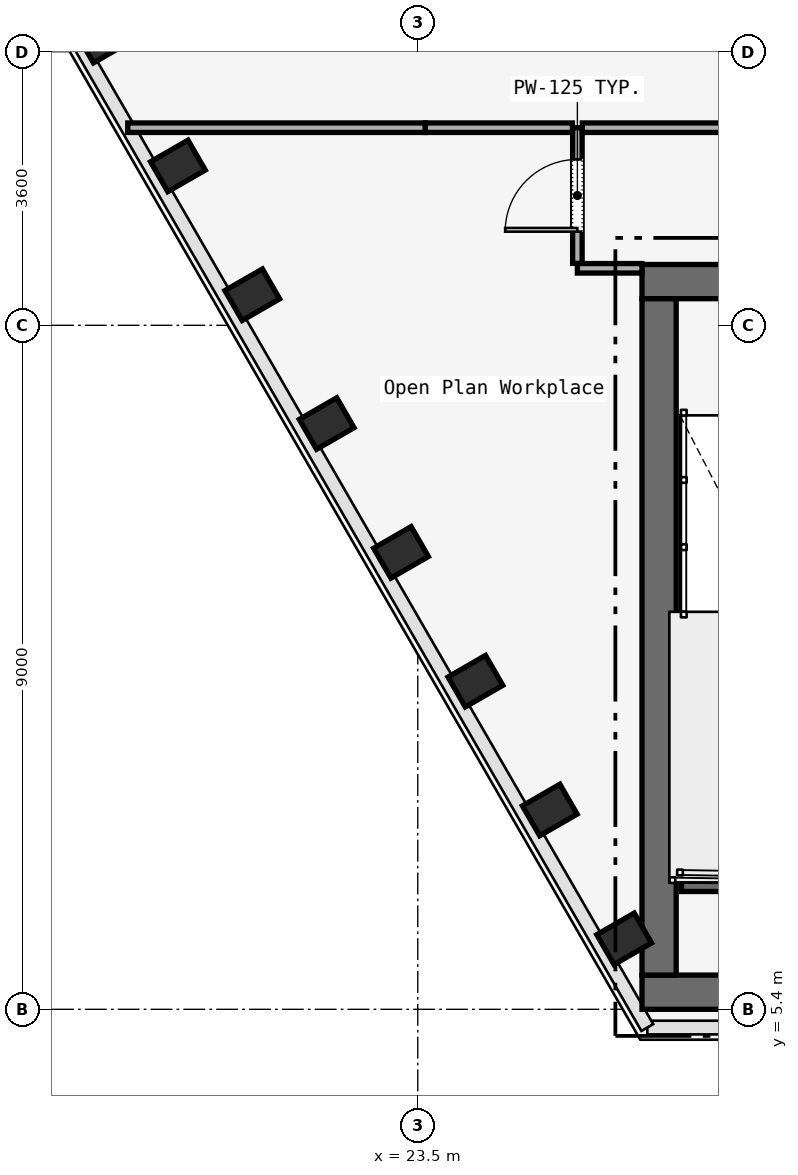
"""IFC4 building model, lengths in metres.
Left out: names, types, materials, properties, quantities, classifications, styles, units other than length and angle.
Written with IfcOpenShell. Run it as: python <this file> out.ifc"""

import sys

from ifc_helpers import new_model, si_unit, direction, frame, frame_2d, origin, origin_2d, place, context, subcontext, project, spatial, rectangle, i_section, extrude, element, fill, save


model = new_model("IFC4")
c1 = context("Model", 3, precision=1e-05, world=origin(), true_north=direction((0.0, 1.0)))
c2 = subcontext(c1, "Body", "Model", "MODEL_VIEW")
j1 = project(units=[si_unit("LENGTHUNIT", "METRE"), si_unit("PLANEANGLEUNIT", "RADIAN")], contexts=[c1])
p1 = place(None, origin())
s1 = spatial("IfcSite", under=j1, at=p1, CompositionType="ELEMENT")
p2 = place(p1, origin())
s2 = spatial("IfcBuilding", under=s1, at=p2, CompositionType="ELEMENT")
p3 = place(p2, frame((0.0, 0.0, 47.4)))
s3 = spatial("IfcBuildingStorey", under=s2, at=p3, CompositionType="ELEMENT", Elevation=47.4)
p4 = place(p3, frame((26.45, 14.975, 0.0), z_axis=(0.0, 0.0, 1.0), x_axis=(1.0, 0.0, 0.0)))
e1 = element("IfcWall", 1, at=p4, inside=s3, PredefinedType="SOLIDWALL", context=c2, shape_type="SweptSolid", body=[
    extrude(rectangle(XDim=31.1, YDim=0.45, at=frame_2d((15.55, 0.0))), origin(), (0.0, 0.0, 1.0), 3.58),
])
p5 = place(p4, frame((1.65, 0.0, 0.0)))
e2 = element("IfcOpeningElement", 2, at=p5, cuts=e1, PredefinedType="OPENING", context=c2, shape_type="SweptSolid", body=[
    extrude(rectangle(XDim=1.1, YDim=2.2, at=frame_2d((0.55, 1.1))), frame((0.0, 0.225, 0.0), z_axis=(0.0, -1.0, 0.0), x_axis=(1.0, 0.0, 0.0)), (0.0, 0.0, 1.0), 0.45),
])
p6 = place(p4, frame((13.65, 0.0, 0.0)))
e3 = element("IfcOpeningElement", 3, at=p6, cuts=e1, PredefinedType="OPENING", context=c2, shape_type="SweptSolid", body=[
    extrude(rectangle(XDim=1.1, YDim=2.2, at=frame_2d((0.55, 1.1))), frame((0.0, 0.225, 0.0), z_axis=(0.0, -1.0, 0.0), x_axis=(1.0, 0.0, 0.0)), (0.0, 0.0, 1.0), 0.45),
])
p7 = place(p4, frame((25.55, 0.0, 0.0)))
e4 = element("IfcOpeningElement", 4, at=p7, cuts=e1, PredefinedType="OPENING", context=c2, shape_type="SweptSolid", body=[
    extrude(rectangle(XDim=1.1, YDim=2.2, at=frame_2d((0.55, 1.1))), frame((0.0, 0.225, 0.0), z_axis=(0.0, -1.0, 0.0), x_axis=(1.0, 0.0, 0.0)), (0.0, 0.0, 1.0), 0.45),
])
p8 = place(p4, frame((10.7, 0.0, 0.0)))
e5 = element("IfcOpeningElement", 5, at=p8, cuts=e1, PredefinedType="OPENING", context=c2, shape_type="SweptSolid", body=[
    extrude(rectangle(XDim=1.4, YDim=2.2, at=frame_2d((0.7, 1.1))), frame((0.0, 0.225, 0.0), z_axis=(0.0, -1.0, 0.0), x_axis=(1.0, 0.0, 0.0)), (0.0, 0.0, 1.0), 0.45),
])
p9 = place(p4, frame((19.35, 0.0, 0.0)))
e6 = element("IfcOpeningElement", 6, at=p9, cuts=e1, PredefinedType="OPENING", context=c2, shape_type="SweptSolid", body=[
    extrude(rectangle(XDim=1.1, YDim=2.2, at=frame_2d((0.55, 1.1))), frame((0.0, 0.225, 0.0), z_axis=(0.0, -1.0, 0.0), x_axis=(1.0, 0.0, 0.0)), (0.0, 0.0, 1.0), 0.45),
])
p10 = place(p4, frame((21.4, 0.0, 0.0)))
e7 = element("IfcOpeningElement", 7, at=p10, cuts=e1, PredefinedType="OPENING", context=c2, shape_type="SweptSolid", body=[
    extrude(rectangle(XDim=0.9, YDim=2.1, at=frame_2d((0.45, 1.05))), frame((0.0, 0.225, 0.0), z_axis=(0.0, -1.0, 0.0), x_axis=(1.0, 0.0, 0.0)), (0.0, 0.0, 1.0), 0.45),
])
p11 = place(p4, frame((23.35, 0.0, 0.0)))
e8 = element("IfcOpeningElement", 8, at=p11, cuts=e1, PredefinedType="OPENING", context=c2, shape_type="SweptSolid", body=[
    extrude(rectangle(XDim=1.3, YDim=2.3, at=frame_2d((0.65, 1.15))), frame((0.0, 0.225, 0.0), z_axis=(0.0, -1.0, 0.0), x_axis=(1.0, 0.0, 0.0)), (0.0, 0.0, 1.0), 0.45),
])
p12 = place(p3, frame((26.45, 5.625, 0.0), z_axis=(0.0, 0.0, 1.0), x_axis=(1.0, 0.0, 0.0)))
e9 = element("IfcWall", 9, at=p12, inside=s3, PredefinedType="SOLIDWALL", context=c2, shape_type="SweptSolid", body=[
    extrude(rectangle(XDim=31.1, YDim=0.45, at=frame_2d((15.55, 0.0))), origin(), (0.0, 0.0, 1.0), 3.58),
])
p13 = place(p3, frame((26.675, 5.85, 0.0), z_axis=(0.0, 0.0, 1.0), x_axis=(0.0, 1.0, 0.0)))
e10 = element("IfcWall", 10, at=p13, inside=s3, PredefinedType="SOLIDWALL", context=c2, shape_type="SweptSolid", body=[
    extrude(rectangle(XDim=8.9, YDim=0.45, at=frame_2d((4.45, 0.0))), origin(), (0.0, 0.0, 1.0), 3.58),
])
for number, where, z_axis, x_axis in (
    (11, (19.365, 18.192, 0.0), (0.0, 0.0, 1.0), (-0.5, 0.866, 0.0)),
    (12, (20.344, 16.497, 0.0), (0.0, 0.0, 1.0), (-0.5, 0.866, 0.0)),
    (13, (21.323, 14.802, 0.0), (0.0, 0.0, 1.0), (-0.5, 0.866, 0.0)),
    (14, (22.301, 13.107, 0.0), (0.0, 0.0, 1.0), (-0.5, 0.866, 0.0)),
    (15, (23.28, 11.412, 0.0), (0.0, 0.0, 1.0), (-0.5, 0.866, 0.0)),
    (16, (24.258, 9.717, 0.0), (0.0, 0.0, 1.0), (-0.5, 0.866, 0.0)),
    (17, (25.237, 8.022, 0.0), (0.0, 0.0, 1.0), (-0.5, 0.866, 0.0)),
    (18, (26.216, 6.327, 0.0), (0.0, 0.0, 1.0), (-0.5, 0.866, 0.0)),
):
    element("IfcColumn", number, at=place(p3, frame(where, z_axis=z_axis, x_axis=x_axis)), inside=s3, PredefinedType="COLUMN", context=c2, shape_type="SweptSolid", body=[
        extrude(i_section(OverallWidth=0.454, OverallDepth=0.569, WebThickness=0.078, FlangeThickness=0.08, FilletRadius=0.015, at=origin_2d()), origin(), (0.0, 0.0, 1.0), 3.58),
    ])
p14 = place(p3, frame((26.97, 7.05, 0.0), z_axis=(0.0, 0.0, 1.0), x_axis=(1.0, 0.0, 0.0)))
e19 = element("IfcWall", 19, at=p14, inside=s3, PredefinedType="SOLIDWALL", context=c2, shape_type="SweptSolid", body=[
    extrude(rectangle(XDim=3.115, YDim=0.2, at=frame_2d((1.558, 0.0))), origin(), (0.0, 0.0, 1.0), 3.8),
])
p15 = place(p3, frame((26.45, 15.15, 0.0), z_axis=(0.0, 0.0, 1.0), x_axis=(-1.0, 0.0, 0.0)))
e20 = element("IfcWall", 20, at=p15, inside=s3, PredefinedType="PARTITIONING", context=c2, shape_type="SweptSolid", body=[
    extrude(rectangle(XDim=0.85, YDim=0.125, at=frame_2d((0.425, 0.0))), origin(), (0.0, 0.0, 1.0), 2.933),
])
p16 = place(p3, frame((25.6, 15.215, 0.0), z_axis=(0.0, 0.0, 1.0), x_axis=(0.0, 1.0, 0.0)))
e21 = element("IfcWall", 21, at=p16, inside=s3, PredefinedType="PARTITIONING", context=c2, shape_type="SweptSolid", body=[
    extrude(rectangle(XDim=1.785, YDim=0.125, at=frame_2d((0.893, 0.0))), origin(), (0.0, 0.0, 1.0), 2.933),
])
p17 = place(p16, frame((0.417, 0.0, 0.0)))
e22 = element("IfcOpeningElement", 22, at=p17, cuts=e21, PredefinedType="OPENING", context=c2, shape_type="SweptSolid", body=[
    extrude(rectangle(XDim=0.95, YDim=2.2, at=frame_2d((0.475, 1.1))), frame((0.0, 0.062, 0.0), z_axis=(0.0, -1.0, 0.0), x_axis=(1.0, 0.0, 0.0)), (0.0, 0.0, 1.0), 0.125),
])
p18 = place(p3, frame((25.665, 17.0, 0.0), z_axis=(0.0, 0.0, 1.0), x_axis=(1.0, 0.0, 0.0)))
e23 = element("IfcWall", 23, at=p18, inside=s3, PredefinedType="PARTITIONING", context=c2, shape_type="SweptSolid", body=[
    extrude(rectangle(XDim=4.135, YDim=0.125, at=frame_2d((2.067, 0.0))), origin(), (0.0, 0.0, 1.0), 2.933),
])
p19 = place(p3, frame((19.684, 17.0, 0.0), z_axis=(0.0, 0.0, 1.0), x_axis=(1.0, 0.0, 0.0)))
e24 = element("IfcWall", 24, at=p19, inside=s3, PredefinedType="PARTITIONING", context=c2, shape_type="SweptSolid", body=[
    extrude(rectangle(XDim=3.916, YDim=0.125, at=frame_2d((1.958, 0.0))), origin(), (0.0, 0.0, 1.0), 2.933),
])
p20 = place(p3, frame((23.6, 17.0, 0.0), z_axis=(0.0, 0.0, 1.0), x_axis=(1.0, 0.0, 0.0)))
e25 = element("IfcWall", 25, at=p20, inside=s3, PredefinedType="PARTITIONING", context=c2, shape_type="SweptSolid", body=[
    extrude(rectangle(XDim=1.935, YDim=0.125, at=frame_2d((0.967, 0.0))), origin(), (0.0, 0.0, 1.0), 2.933),
])
p21 = place(p17, origin())
e26 = element("IfcDoor", 26, at=p21, inside=s3, OperationType="SINGLE_SWING_RIGHT", PredefinedType="DOOR", context=c2, shape_type="SweptSolid", body=[
    extrude(rectangle(XDim=0.95, YDim=2.2, at=frame_2d((0.475, 1.1))), frame((0.0, 0.025, 0.0), z_axis=(0.0, -1.0, 0.0), x_axis=(1.0, 0.0, 0.0)), (0.0, 0.0, 1.0), 0.05),
])
fill(e22, e26)
save(model, sys.argv[1])
